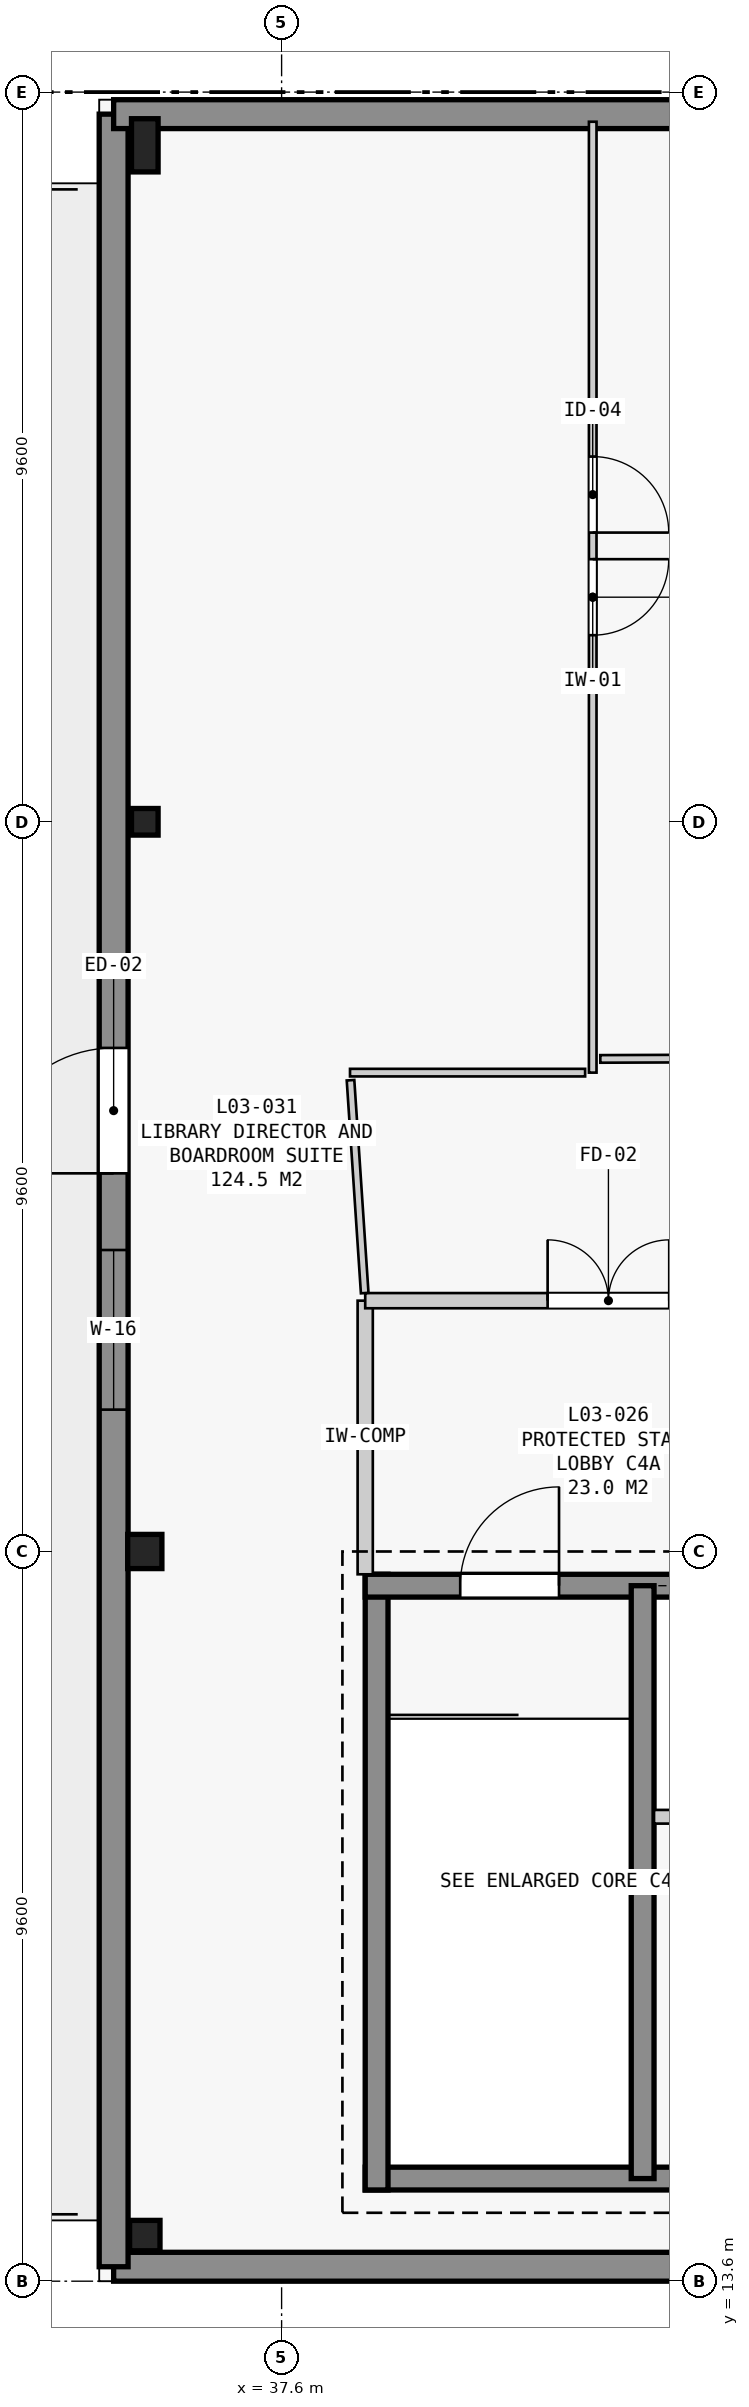
"""IFC4 building model, lengths in metres.
Left out: names, types, materials, properties, quantities, classifications, styles, units other than length and angle.
Written with IfcOpenShell. Run it as: python <this file> out.ifc"""

import sys

from ifc_helpers import new_model, si_unit, direction, frame, frame_2d, origin, origin_2d, place, context, subcontext, project, spatial, rectangle, extrude, element, fill, save


model = new_model("IFC4")
c1 = context("Model", 3, precision=1e-05, world=origin(), true_north=direction((0.0, 1.0)))
c2 = subcontext(c1, "Body", "Model", "MODEL_VIEW")
j1 = project(units=[si_unit("LENGTHUNIT", "METRE"), si_unit("PLANEANGLEUNIT", "RADIAN")], contexts=[c1])
p1 = place(None, origin())
s1 = spatial("IfcSite", under=j1, at=p1, CompositionType="ELEMENT")
p2 = place(p1, origin())
s2 = spatial("IfcBuilding", under=s1, at=p2, CompositionType="ELEMENT")
p3 = place(p2, frame((0.0, 0.0, 13.8)))
s3 = spatial("IfcBuildingStorey", under=s2, at=p3, CompositionType="ELEMENT", Elevation=13.8)
p4 = place(p3, frame((35.8, 14.2, 0.0), z_axis=(0.0, 0.0, 1.0), x_axis=(1.0, 0.0, 0.0)))
e1 = element("IfcColumn", 1, at=p4, inside=s3, PredefinedType="COLUMN", context=c2, shape_type="SweptSolid", body=[
    extrude(rectangle(XDim=0.4, YDim=0.4, at=origin_2d()), origin(), (0.0, 0.0, 1.0), 4.5),
])
p5 = place(p3, frame((35.8, 23.2, 0.0), z_axis=(0.0, 0.0, 1.0), x_axis=(1.0, 0.0, 0.0)))
e2 = element("IfcColumn", 2, at=p5, inside=s3, PredefinedType="COLUMN", context=c2, shape_type="SweptSolid", body=[
    extrude(rectangle(XDim=0.45, YDim=0.45, at=origin_2d()), origin(), (0.0, 0.0, 1.0), 4.5),
])
p6 = place(p3, frame((35.8, 32.8, 0.0), z_axis=(0.0, 0.0, 1.0), x_axis=(1.0, 0.0, 0.0)))
e3 = element("IfcColumn", 3, at=p6, inside=s3, PredefinedType="COLUMN", context=c2, shape_type="SweptSolid", body=[
    extrude(rectangle(XDim=0.35, YDim=0.35, at=origin_2d()), origin(), (0.0, 0.0, 1.0), 4.5),
])
p7 = place(p3, frame((35.8, 41.7, 0.0), z_axis=(0.0, 0.0, 1.0), x_axis=(1.0, 0.0, 0.0)))
e4 = element("IfcColumn", 4, at=p7, inside=s3, PredefinedType="COLUMN", context=c2, shape_type="SweptSolid", body=[
    extrude(rectangle(XDim=0.35, YDim=0.7, at=origin_2d()), origin(), (0.0, 0.0, 1.0), 4.5),
])
p8 = place(p3, frame((54.11, 13.79, 0.0), z_axis=(0.0, 0.0, 1.0), x_axis=(-1.0, 0.0, 0.0)))
e5 = element("IfcWall", 5, at=p8, inside=s3, PredefinedType="STANDARD", context=c2, shape_type="SweptSolid", body=[
    extrude(rectangle(XDim=18.72, YDim=0.38, at=frame_2d((9.36, 0.0))), origin(), (0.0, 0.0, 1.0), 4.24),
])
p9 = place(p8, frame((8.834, 0.0, 1.05)))
e6 = element("IfcOpeningElement", 6, at=p9, cuts=e5, PredefinedType="OPENING", context=c2, shape_type="SweptSolid", body=[
    extrude(rectangle(XDim=1.8, YDim=2.5, at=frame_2d((0.9, 1.25))), frame((0.0, 0.2, 0.0), z_axis=(0.0, -1.0, 0.0), x_axis=(1.0, 0.0, 0.0)), (0.0, 0.0, 1.0), 0.4),
])
p10 = place(p3, frame((35.39, 13.79, 0.0), z_axis=(0.0, 0.0, 1.0), x_axis=(0.0, 1.0, 0.0)))
e7 = element("IfcWall", 7, at=p10, inside=s3, PredefinedType="STANDARD", context=c2, shape_type="SweptSolid", body=[
    extrude(rectangle(XDim=28.32, YDim=0.38, at=frame_2d((14.16, 0.0))), origin(), (0.0, 0.0, 1.0), 4.24),
])
p11 = place(p10, frame((14.385, 0.0, 0.0)))
e8 = element("IfcOpeningElement", 8, at=p11, cuts=e7, PredefinedType="OPENING", context=c2, shape_type="SweptSolid", body=[
    extrude(rectangle(XDim=1.65, YDim=2.3, at=frame_2d((0.825, 1.15))), frame((0.0, 0.2, 0.0), z_axis=(0.0, -1.0, 0.0), x_axis=(1.0, 0.0, 0.0)), (0.0, 0.0, 1.0), 0.4),
])
p12 = place(p10, frame((11.276, 0.0, 1.65)))
e9 = element("IfcOpeningElement", 9, at=p12, cuts=e7, PredefinedType="OPENING", context=c2, shape_type="SweptSolid", body=[
    extrude(rectangle(XDim=2.1, YDim=1.6, at=frame_2d((1.05, 0.8))), frame((0.0, 0.2, 0.0), z_axis=(0.0, -1.0, 0.0), x_axis=(1.0, 0.0, 0.0)), (0.0, 0.0, 1.0), 0.4),
])
p13 = place(p3, frame((35.39, 42.11, 0.0), z_axis=(0.0, 0.0, 1.0), x_axis=(1.0, 0.0, 0.0)))
e10 = element("IfcWall", 10, at=p13, inside=s3, PredefinedType="STANDARD", context=c2, shape_type="SweptSolid", body=[
    extrude(rectangle(XDim=18.72, YDim=0.38, at=frame_2d((9.36, 0.0))), origin(), (0.0, 0.0, 1.0), 4.24),
])
p14 = place(p13, frame((8.534, 0.0, 1.65)))
e11 = element("IfcOpeningElement", 11, at=p14, cuts=e10, PredefinedType="OPENING", context=c2, shape_type="SweptSolid", body=[
    extrude(rectangle(XDim=2.4, YDim=1.8, at=frame_2d((1.2, 0.9))), frame((0.0, 0.2, 0.0), z_axis=(0.0, -1.0, 0.0), x_axis=(1.0, 0.0, 0.0)), (0.0, 0.0, 1.0), 0.4),
])
p15 = place(p3, frame((45.1, 14.95, 0.0), z_axis=(0.0, 0.0, 1.0), x_axis=(-1.0, 0.0, 0.0)))
e12 = element("IfcWall", 12, at=p15, inside=s3, PredefinedType="SHEAR", context=c2, shape_type="SweptSolid", body=[
    extrude(rectangle(XDim=6.4, YDim=0.3, at=frame_2d((3.2, 0.0))), origin(), (0.0, 0.0, 1.0), 4.5),
])
p16 = place(p3, frame((38.85, 14.8, 0.0), z_axis=(0.0, 0.0, 1.0), x_axis=(0.0, 1.0, 0.0)))
e13 = element("IfcWall", 13, at=p16, inside=s3, PredefinedType="SHEAR", context=c2, shape_type="SweptSolid", body=[
    extrude(rectangle(XDim=8.1, YDim=0.3, at=frame_2d((4.05, 0.0))), origin(), (0.0, 0.0, 1.0), 4.5),
])
p17 = place(p3, frame((38.7, 22.75, 0.0), z_axis=(0.0, 0.0, 1.0), x_axis=(1.0, 0.0, 0.0)))
e14 = element("IfcWall", 14, at=p17, inside=s3, PredefinedType="SHEAR", context=c2, shape_type="SweptSolid", body=[
    extrude(rectangle(XDim=6.4, YDim=0.3, at=frame_2d((3.2, 0.0))), origin(), (0.0, 0.0, 1.0), 4.5),
])
p18 = place(p17, frame((1.25, 0.0, 0.0)))
e15 = element("IfcOpeningElement", 15, at=p18, cuts=e14, PredefinedType="OPENING", context=c2, shape_type="SweptSolid", body=[
    extrude(rectangle(XDim=1.3, YDim=2.2, at=frame_2d((0.65, 1.1))), frame((0.0, 0.16, 0.0), z_axis=(0.0, -1.0, 0.0), x_axis=(1.0, 0.0, 0.0)), (0.0, 0.0, 1.0), 0.32),
])
p19 = place(p17, frame((4.45, 0.0, 0.0)))
e16 = element("IfcOpeningElement", 16, at=p19, cuts=e14, PredefinedType="OPENING", context=c2, shape_type="SweptSolid", body=[
    extrude(rectangle(XDim=1.0, YDim=2.15, at=frame_2d((0.5, 1.075))), frame((0.0, 0.16, 0.0), z_axis=(0.0, -1.0, 0.0), x_axis=(1.0, 0.0, 0.0)), (0.0, 0.0, 1.0), 0.32),
])
p20 = place(p3, frame((42.35, 14.95, 0.0), z_axis=(0.0, 0.0, 1.0), x_axis=(0.0, 1.0, 0.0)))
e17 = element("IfcWall", 17, at=p20, inside=s3, PredefinedType="SHEAR", context=c2, shape_type="SweptSolid", body=[
    extrude(rectangle(XDim=7.8, YDim=0.3, at=frame_2d((3.9, 0.0))), origin(), (0.0, 0.0, 1.0), 4.5),
])
p21 = place(p3, frame((42.5, 19.71, 0.0), z_axis=(0.0, 0.0, 1.0), x_axis=(1.0, 0.0, 0.0)))
e18 = element("IfcWall", 18, at=p21, inside=s3, PredefinedType="PARTITIONING", context=c2, shape_type="SweptSolid", body=[
    extrude(rectangle(XDim=2.3, YDim=0.18, at=frame_2d((1.15, 0.0))), origin(), (0.0, 0.0, 1.0), 4.5),
])
p22 = place(p3, frame((38.7, 22.9, 0.0), z_axis=(0.0, 0.0, 1.0), x_axis=(0.0, 1.0, 0.0)))
e19 = element("IfcWall", 19, at=p22, inside=s3, PredefinedType="STANDARD", context=c2, shape_type="SweptSolid", body=[
    extrude(rectangle(XDim=3.6, YDim=0.2, at=frame_2d((1.8, 0.0))), origin(), (0.0, 0.0, 1.0), 3.52),
])
p23 = place(p3, frame((38.7, 26.5, 0.0), z_axis=(0.0, 0.0, 1.0), x_axis=(1.0, 0.0, 0.0)))
e20 = element("IfcWall", 20, at=p23, inside=s3, PredefinedType="STANDARD", context=c2, shape_type="SweptSolid", body=[
    extrude(rectangle(XDim=6.4, YDim=0.2, at=frame_2d((3.2, 0.0))), origin(), (0.0, 0.0, 1.0), 3.77),
])
p24 = place(p23, frame((2.4, 0.0, 0.0)))
e21 = element("IfcOpeningElement", 21, at=p24, cuts=e20, PredefinedType="OPENING", context=c2, shape_type="SweptSolid", body=[
    extrude(rectangle(XDim=1.6, YDim=2.2, at=frame_2d((0.8, 1.1))), frame((0.0, 0.11, 0.0), z_axis=(0.0, -1.0, 0.0), x_axis=(1.0, 0.0, 0.0)), (0.0, 0.0, 1.0), 0.22),
])
p25 = place(p3, frame((41.693, 42.01, 0.0), z_axis=(0.0, 0.0, 1.0), x_axis=(0.0, -1.0, 0.0)))
e22 = element("IfcWall", 22, at=p25, inside=s3, PredefinedType="PARTITIONING", context=c2, shape_type="SweptSolid", body=[
    extrude(rectangle(XDim=12.51, YDim=0.1, at=frame_2d((6.255, 0.0))), origin(), (0.0, 0.0, 1.0), 3.42),
])
p26 = place(p25, frame((5.755, 0.0, 0.0)))
e23 = element("IfcOpeningElement", 23, at=p26, cuts=e22, PredefinedType="OPENING", context=c2, shape_type="SweptSolid", body=[
    extrude(rectangle(XDim=1.0, YDim=2.15, at=frame_2d((0.5, 1.075))), frame((0.0, 0.06, 0.0), z_axis=(0.0, -1.0, 0.0), x_axis=(1.0, 0.0, 0.0)), (0.0, 0.0, 1.0), 0.12),
])
p27 = place(p25, frame((4.405, 0.0, 0.0)))
e24 = element("IfcOpeningElement", 24, at=p27, cuts=e22, PredefinedType="OPENING", context=c2, shape_type="SweptSolid", body=[
    extrude(rectangle(XDim=1.0, YDim=2.15, at=frame_2d((0.5, 1.075))), frame((0.0, 0.06, 0.0), z_axis=(0.0, -1.0, 0.0), x_axis=(1.0, 0.0, 0.0)), (0.0, 0.0, 1.0), 0.12),
])
p28 = place(p3, frame((41.593, 29.5, 0.0), z_axis=(0.0, 0.0, 1.0), x_axis=(-1.0, 0.0, 0.0)))
e25 = element("IfcWall", 25, at=p28, inside=s3, PredefinedType="PARTITIONING", context=c2, shape_type="SweptSolid", body=[
    extrude(rectangle(XDim=3.093, YDim=0.1, at=frame_2d((1.547, 0.0))), origin(), (0.0, 0.0, 1.0), 4.24),
])
p29 = place(p3, frame((38.507, 29.4, 0.0), z_axis=(0.0, 0.0, 1.0), x_axis=(0.066547879088, -0.997783232866, 0.0)))
e26 = element("IfcWall", 26, at=p29, inside=s3, PredefinedType="PARTITIONING", context=c2, shape_type="SweptSolid", body=[
    extrude(rectangle(XDim=2.806, YDim=0.1, at=frame_2d((1.403, 0.0))), origin(), (0.0, 0.0, 1.0), 4.24),
])
p30 = place(p3, frame((47.0, 29.7, 0.0), z_axis=(0.0, 0.0, 1.0), x_axis=(-0.99999313943, -0.003704199279, 0.0)))
e27 = element("IfcWall", 27, at=p30, inside=s3, PredefinedType="PARTITIONING", context=c2, shape_type="SweptSolid", body=[
    extrude(rectangle(XDim=5.207, YDim=0.1, at=frame_2d((2.604, 0.0))), origin(), (0.0, 0.0, 1.0), 3.77),
])
p31 = place(p11, origin())
e28 = element("IfcDoor", 28, at=p31, inside=s3, OperationType="SINGLE_SWING_LEFT", PredefinedType="DOOR", context=c2, shape_type="SweptSolid", body=[
    extrude(rectangle(XDim=1.65, YDim=2.3, at=frame_2d((0.825, 1.15))), frame((0.0, 0.025, 0.0), z_axis=(0.0, -1.0, 0.0), x_axis=(1.0, 0.0, 0.0)), (0.0, 0.0, 1.0), 0.05),
])
fill(e8, e28)
p32 = place(p12, origin())
e29 = element("IfcWindow", 29, at=p32, inside=s3, PartitioningType="SINGLE_PANEL", PredefinedType="WINDOW", context=c2, shape_type="SweptSolid", body=[
    extrude(rectangle(XDim=2.1, YDim=1.6, at=frame_2d((1.05, 0.8))), frame((0.0, 0.03, 0.0), z_axis=(0.0, -1.0, 0.0), x_axis=(1.0, 0.0, 0.0)), (0.0, 0.0, 1.0), 0.06),
])
fill(e9, e29)
p33 = place(p18, origin())
e30 = element("IfcDoor", 30, at=p33, inside=s3, OperationType="SINGLE_SWING_RIGHT", PredefinedType="DOOR", context=c2, shape_type="SweptSolid", body=[
    extrude(rectangle(XDim=1.3, YDim=2.2, at=frame_2d((0.65, 1.1))), frame((0.0, 0.025, 0.0), z_axis=(0.0, -1.0, 0.0), x_axis=(1.0, 0.0, 0.0)), (0.0, 0.0, 1.0), 0.05),
])
fill(e15, e30)
p34 = place(p24, origin())
e31 = element("IfcDoor", 31, at=p34, inside=s3, OperationType="DOUBLE_DOOR_SINGLE_SWING", PredefinedType="DOOR", context=c2, shape_type="SweptSolid", body=[
    extrude(rectangle(XDim=1.6, YDim=2.2, at=frame_2d((0.8, 1.1))), frame((0.0, 0.025, 0.0), z_axis=(0.0, -1.0, 0.0), x_axis=(1.0, 0.0, 0.0)), (0.0, 0.0, 1.0), 0.05),
])
fill(e21, e31)
p35 = place(p26, origin())
e32 = element("IfcDoor", 32, at=p35, inside=s3, OperationType="SINGLE_SWING_LEFT", PredefinedType="DOOR", context=c2, shape_type="SweptSolid", body=[
    extrude(rectangle(XDim=1.0, YDim=2.15, at=frame_2d((0.5, 1.075))), frame((0.0, 0.025, 0.0), z_axis=(0.0, -1.0, 0.0), x_axis=(1.0, 0.0, 0.0)), (0.0, 0.0, 1.0), 0.05),
])
fill(e23, e32)
p36 = place(p27, origin())
e33 = element("IfcDoor", 33, at=p36, inside=s3, OperationType="SINGLE_SWING_RIGHT", PredefinedType="DOOR", context=c2, shape_type="SweptSolid", body=[
    extrude(rectangle(XDim=1.0, YDim=2.15, at=frame_2d((0.5, 1.075))), frame((0.0, 0.025, 0.0), z_axis=(0.0, -1.0, 0.0), x_axis=(1.0, 0.0, 0.0)), (0.0, 0.0, 1.0), 0.05),
])
fill(e24, e33)
save(model, sys.argv[1])
